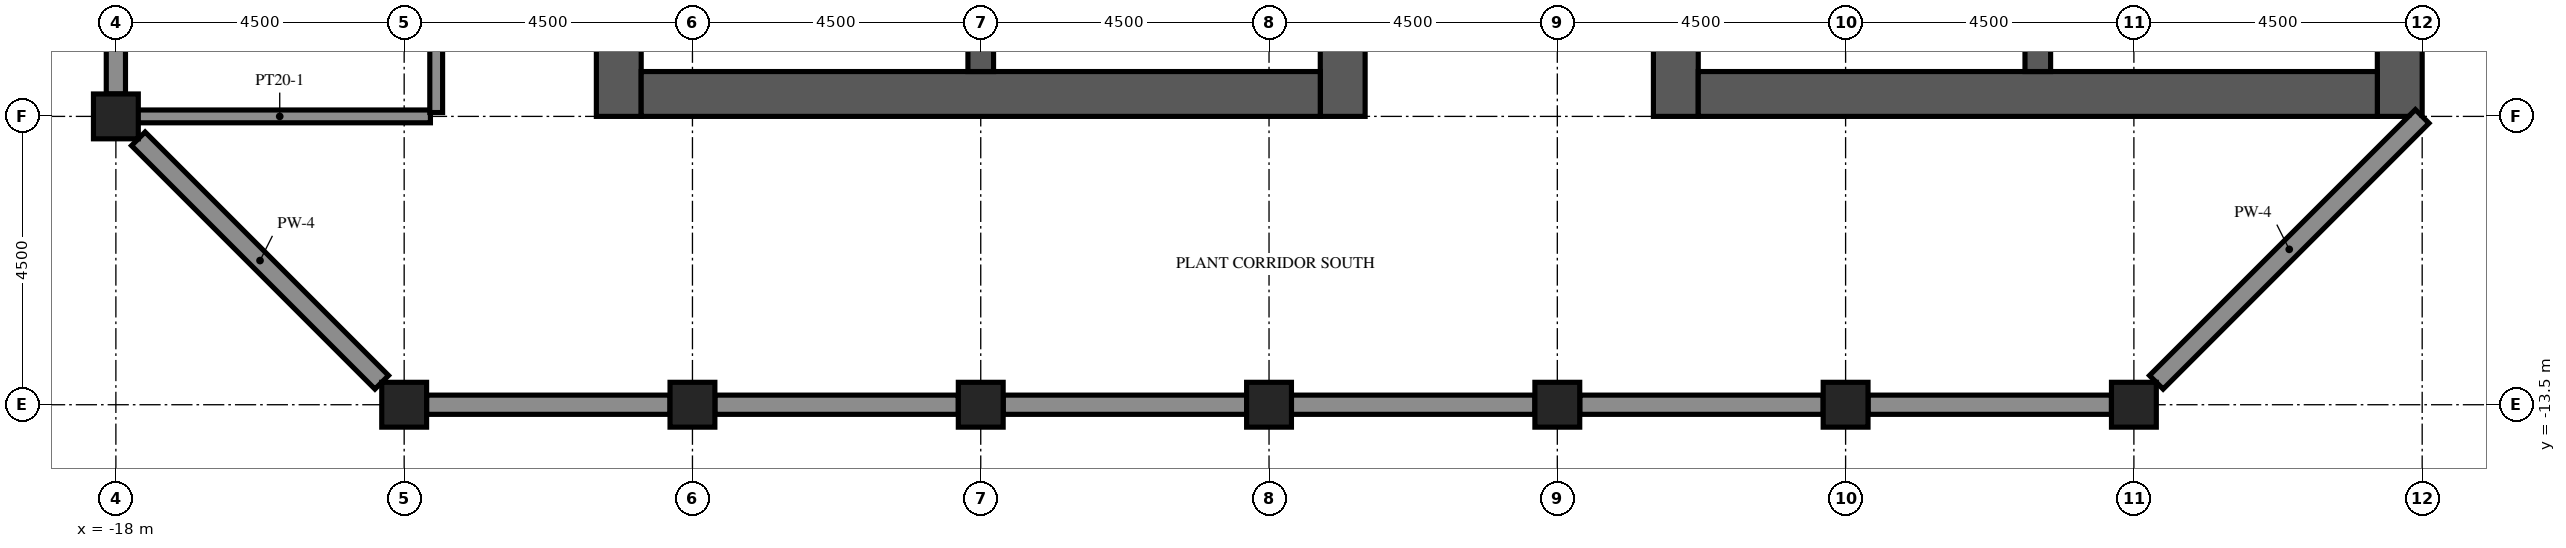
"""IFC4 building model, lengths in metres.
Left out: names, types, materials, properties, quantities, classifications, styles, units other than length and angle.
Written with IfcOpenShell. Run it as: python <this file> out.ifc"""

import sys

from ifc_helpers import new_model, si_unit, direction, frame, frame_2d, origin, origin_2d, place, context, subcontext, project, spatial, rectangle, extrude, element, save


model = new_model("IFC4")
c1 = context("Model", 3, precision=1e-05, world=origin(), true_north=direction((0.0, 1.0)))
c2 = subcontext(c1, "Body", "Model", "MODEL_VIEW")
j1 = project(units=[si_unit("LENGTHUNIT", "METRE"), si_unit("PLANEANGLEUNIT", "RADIAN")], contexts=[c1])
p1 = place(None, origin())
s1 = spatial("IfcSite", under=j1, at=p1, CompositionType="ELEMENT")
p2 = place(p1, origin())
s2 = spatial("IfcBuilding", under=s1, at=p2, CompositionType="ELEMENT")
p3 = place(p2, frame((0.0, 0.0, 301.0)))
s3 = spatial("IfcBuildingStorey", under=s2, at=p3, CompositionType="ELEMENT", Elevation=301.0)
for number, where, z_axis, x_axis in (
    (1, (-18.0, -9.0, -0.6), (0.0, 0.0, 1.0), (1.0, 0.0, 0.0)),
    (2, (-13.5, -13.5, -0.6), (0.0, 0.0, 1.0), (1.0, 0.0, 0.0)),
    (3, (-9.0, -13.5, -0.6), (0.0, 0.0, 1.0), (1.0, 0.0, 0.0)),
    (4, (-4.5, -13.5, -0.6), (0.0, 0.0, 1.0), (1.0, 0.0, 0.0)),
    (5, (0.0, -13.5, -0.6), (0.0, 0.0, 1.0), (1.0, 0.0, 0.0)),
    (6, (4.5, -13.5, -0.6), (0.0, 0.0, 1.0), (1.0, 0.0, 0.0)),
    (7, (9.0, -13.5, -0.6), (0.0, 0.0, 1.0), (1.0, 0.0, 0.0)),
    (8, (13.5, -13.5, -0.6), (0.0, 0.0, 1.0), (1.0, 0.0, 0.0)),
):
    element("IfcColumn", number, at=place(p3, frame(where, z_axis=z_axis, x_axis=x_axis)), inside=s3, PredefinedType="COLUMN", context=c2, shape_type="SweptSolid", body=[
        extrude(rectangle(XDim=0.7, YDim=0.7, at=origin_2d()), origin(), (0.0, 0.0, 1.0), 6.0),
    ])
p4 = place(p3, frame((-10.15, -9.0, 0.0), z_axis=(0.0, 0.0, 1.0), x_axis=(0.0, 1.0, 0.0)))
e9 = element("IfcWall", 9, at=p4, inside=s3, PredefinedType="SHEAR", context=c2, shape_type="SweptSolid", body=[
    extrude(rectangle(XDim=27.5, YDim=0.7, at=frame_2d((13.75, 0.0))), origin(), (0.0, 0.0, 1.0), 5.4),
])
p5 = place(p4, frame((12.55, 0.0, 0.0)))
e10 = element("IfcOpeningElement", 10, at=p5, cuts=e9, PredefinedType="OPENING", context=c2, shape_type="SweptSolid", body=[
    extrude(rectangle(XDim=2.4, YDim=2.4, at=frame_2d((1.2, 1.2))), frame((0.0, 0.36, 0.0), z_axis=(0.0, -1.0, 0.0), x_axis=(1.0, 0.0, 0.0)), (0.0, 0.0, 1.0), 0.72),
])
p6 = place(p4, frame((6.825, 0.0, 0.0)))
e11 = element("IfcOpeningElement", 11, at=p6, cuts=e9, PredefinedType="OPENING", context=c2, shape_type="SweptSolid", body=[
    extrude(rectangle(XDim=1.2, YDim=2.1, at=frame_2d((0.6, 1.05))), frame((0.0, 0.36, 0.0), z_axis=(0.0, -1.0, 0.0), x_axis=(1.0, 0.0, 0.0)), (0.0, 0.0, 1.0), 0.72),
])
p7 = place(p4, frame((19.475, 0.0, 0.0)))
e12 = element("IfcOpeningElement", 12, at=p7, cuts=e9, PredefinedType="OPENING", context=c2, shape_type="SweptSolid", body=[
    extrude(rectangle(XDim=1.2, YDim=2.1, at=frame_2d((0.6, 1.05))), frame((0.0, 0.36, 0.0), z_axis=(0.0, -1.0, 0.0), x_axis=(1.0, 0.0, 0.0)), (0.0, 0.0, 1.0), 0.72),
])
p8 = place(p3, frame((1.15, -9.0, 0.0), z_axis=(0.0, 0.0, 1.0), x_axis=(0.0, 1.0, 0.0)))
e13 = element("IfcWall", 13, at=p8, inside=s3, PredefinedType="SHEAR", context=c2, shape_type="SweptSolid", body=[
    extrude(rectangle(XDim=27.5, YDim=0.7, at=frame_2d((13.75, 0.0))), origin(), (0.0, 0.0, 1.0), 5.4),
])
p9 = place(p8, frame((12.55, 0.0, 0.0)))
e14 = element("IfcOpeningElement", 14, at=p9, cuts=e13, PredefinedType="OPENING", context=c2, shape_type="SweptSolid", body=[
    extrude(rectangle(XDim=2.4, YDim=2.4, at=frame_2d((1.2, 1.2))), frame((0.0, 0.36, 0.0), z_axis=(0.0, -1.0, 0.0), x_axis=(1.0, 0.0, 0.0)), (0.0, 0.0, 1.0), 0.72),
])
p10 = place(p8, frame((5.46, 0.0, 0.0)))
e15 = element("IfcOpeningElement", 15, at=p10, cuts=e13, PredefinedType="OPENING", context=c2, shape_type="SweptSolid", body=[
    extrude(rectangle(XDim=0.968, YDim=2.1, at=frame_2d((0.484, 1.05))), frame((0.0, 0.36, 0.0), z_axis=(0.0, -1.0, 0.0), x_axis=(1.0, 0.0, 0.0)), (0.0, 0.0, 1.0), 0.72),
])
p11 = place(p8, frame((23.54, 0.0, 0.0)))
e16 = element("IfcOpeningElement", 16, at=p11, cuts=e13, PredefinedType="OPENING", context=c2, shape_type="SweptSolid", body=[
    extrude(rectangle(XDim=1.2, YDim=2.1, at=frame_2d((0.6, 1.05))), frame((0.0, 0.36, 0.0), z_axis=(0.0, -1.0, 0.0), x_axis=(1.0, 0.0, 0.0)), (0.0, 0.0, 1.0), 0.72),
])
p12 = place(p3, frame((-9.8, -8.65, 0.0), z_axis=(0.0, 0.0, 1.0), x_axis=(1.0, 0.0, 0.0)))
e17 = element("IfcWall", 17, at=p12, inside=s3, PredefinedType="SHEAR", context=c2, shape_type="SweptSolid", body=[
    extrude(rectangle(XDim=10.6, YDim=0.7, at=frame_2d((5.3, 0.0))), origin(), (0.0, 0.0, 1.0), 5.4),
])
p13 = place(p3, frame((-4.5, -8.3, 0.0), z_axis=(0.0, 0.0, 1.0), x_axis=(0.0, 1.0, 0.0)))
e18 = element("IfcWall", 18, at=p13, inside=s3, PredefinedType="SHEAR", context=c2, shape_type="SweptSolid", body=[
    extrude(rectangle(XDim=7.6, YDim=0.4, at=frame_2d((3.8, 0.0))), origin(), (0.0, 0.0, 1.0), 5.4),
])
p14 = place(p3, frame((6.35, -9.0, 0.0), z_axis=(0.0, 0.0, 1.0), x_axis=(0.0, 1.0, 0.0)))
e19 = element("IfcWall", 19, at=p14, inside=s3, PredefinedType="SHEAR", context=c2, shape_type="SweptSolid", body=[
    extrude(rectangle(XDim=27.5, YDim=0.7, at=frame_2d((13.75, 0.0))), origin(), (0.0, 0.0, 1.0), 5.4),
])
p15 = place(p14, frame((12.55, 0.0, 0.0)))
e20 = element("IfcOpeningElement", 20, at=p15, cuts=e19, PredefinedType="OPENING", context=c2, shape_type="SweptSolid", body=[
    extrude(rectangle(XDim=2.4, YDim=2.4, at=frame_2d((1.2, 1.2))), frame((0.0, 0.36, 0.0), z_axis=(0.0, -1.0, 0.0), x_axis=(1.0, 0.0, 0.0)), (0.0, 0.0, 1.0), 0.72),
])
p16 = place(p14, frame((3.9, 0.0, 0.0)))
e21 = element("IfcOpeningElement", 21, at=p16, cuts=e19, PredefinedType="OPENING", context=c2, shape_type="SweptSolid", body=[
    extrude(rectangle(XDim=1.2, YDim=2.1, at=frame_2d((0.6, 1.05))), frame((0.0, 0.36, 0.0), z_axis=(0.0, -1.0, 0.0), x_axis=(1.0, 0.0, 0.0)), (0.0, 0.0, 1.0), 0.72),
])
p17 = place(p14, frame((22.4, 0.0, 0.0)))
e22 = element("IfcOpeningElement", 22, at=p17, cuts=e19, PredefinedType="OPENING", context=c2, shape_type="SweptSolid", body=[
    extrude(rectangle(XDim=1.2, YDim=2.1, at=frame_2d((0.6, 1.05))), frame((0.0, 0.36, 0.0), z_axis=(0.0, -1.0, 0.0), x_axis=(1.0, 0.0, 0.0)), (0.0, 0.0, 1.0), 0.72),
])
p18 = place(p3, frame((17.65, -9.0, 0.0), z_axis=(0.0, 0.0, 1.0), x_axis=(0.0, 1.0, 0.0)))
e23 = element("IfcWall", 23, at=p18, inside=s3, PredefinedType="SHEAR", context=c2, shape_type="SweptSolid", body=[
    extrude(rectangle(XDim=27.5, YDim=0.7, at=frame_2d((13.75, 0.0))), origin(), (0.0, 0.0, 1.0), 5.4),
])
p19 = place(p3, frame((6.7, -8.65, 0.0), z_axis=(0.0, 0.0, 1.0), x_axis=(1.0, 0.0, 0.0)))
e24 = element("IfcWall", 24, at=p19, inside=s3, PredefinedType="SHEAR", context=c2, shape_type="SweptSolid", body=[
    extrude(rectangle(XDim=10.6, YDim=0.7, at=frame_2d((5.3, 0.0))), origin(), (0.0, 0.0, 1.0), 5.4),
])
p20 = place(p3, frame((12.0, -8.3, 0.0), z_axis=(0.0, 0.0, 1.0), x_axis=(0.0, 1.0, 0.0)))
e25 = element("IfcWall", 25, at=p20, inside=s3, PredefinedType="SHEAR", context=c2, shape_type="SweptSolid", body=[
    extrude(rectangle(XDim=7.6, YDim=0.4, at=frame_2d((3.8, 0.0))), origin(), (0.0, 0.0, 1.0), 5.4),
])
p21 = place(p20, frame((6.125, 0.0, 0.0)))
e26 = element("IfcOpeningElement", 26, at=p21, cuts=e25, PredefinedType="OPENING", context=c2, shape_type="SweptSolid", body=[
    extrude(rectangle(XDim=1.2, YDim=2.1, at=frame_2d((0.6, 1.05))), frame((0.0, 0.21, 0.0), z_axis=(0.0, -1.0, 0.0), x_axis=(1.0, 0.0, 0.0)), (0.0, 0.0, 1.0), 0.42),
])
for number, where, z_axis, x_axis in (
    (27, (-13.15, -13.5, 0.0), (0.0, 0.0, 1.0), (1.0, 0.0, 0.0)),
    (28, (-8.65, -13.5, 0.0), (0.0, 0.0, 1.0), (1.0, 0.0, 0.0)),
    (29, (-4.15, -13.5, 0.0), (0.0, 0.0, 1.0), (1.0, 0.0, 0.0)),
    (30, (0.35, -13.5, 0.0), (0.0, 0.0, 1.0), (1.0, 0.0, 0.0)),
    (31, (4.85, -13.5, 0.0), (0.0, 0.0, 1.0), (1.0, 0.0, 0.0)),
    (32, (9.35, -13.5, 0.0), (0.0, 0.0, 1.0), (1.0, 0.0, 0.0)),
):
    element("IfcWall", number, at=place(p3, frame(where, z_axis=z_axis, x_axis=x_axis)), inside=s3, PredefinedType="SOLIDWALL", context=c2, shape_type="SweptSolid", body=[
        extrude(rectangle(XDim=3.8, YDim=0.3, at=frame_2d((1.9, 0.0))), origin(), (0.0, 0.0, 1.0), 0.85),
    ])
p22 = place(p3, frame((13.85, -13.15, 0.0), z_axis=(0.0, 0.0, 1.0), x_axis=(0.707106781187, 0.707106781187, 0.0)))
e33 = element("IfcWall", 33, at=p22, inside=s3, PredefinedType="SOLIDWALL", context=c2, shape_type="SweptSolid", body=[
    extrude(rectangle(XDim=5.869, YDim=0.3, at=frame_2d((2.935, 0.0))), origin(), (0.0, 0.0, 1.0), 4.1),
])
p23 = place(p3, frame((-18.0, -4.85, 0.0), z_axis=(0.0, 0.0, 1.0), x_axis=(0.0, -1.0, 0.0)))
e34 = element("IfcWall", 34, at=p23, inside=s3, PredefinedType="SOLIDWALL", context=c2, shape_type="SweptSolid", body=[
    extrude(rectangle(XDim=3.8, YDim=0.3, at=frame_2d((1.9, 0.0))), origin(), (0.0, 0.0, 1.0), 0.85),
])
p24 = place(p3, frame((-17.65, -9.35, 0.0), z_axis=(0.0, 0.0, 1.0), x_axis=(0.707106781187, -0.707106781187, 0.0)))
e35 = element("IfcWall", 35, at=p24, inside=s3, PredefinedType="SOLIDWALL", context=c2, shape_type="SweptSolid", body=[
    extrude(rectangle(XDim=5.374, YDim=0.3, at=frame_2d((2.687, 0.0))), origin(), (0.0, 0.0, 1.0), 4.1),
])
for number, where, z_axis, x_axis in (
    (36, (-17.917, -17.8, 0.0), (0.0, 0.0, 1.0), (-0.707, 0.707, 0.0)),
    (37, (22.3, -13.417, 0.0), (0.0, 0.0, 1.0), (-0.707, -0.707, 0.0)),
):
    element("IfcWall", number, at=place(p3, frame(where, z_axis=z_axis, x_axis=x_axis)), inside=s3, PredefinedType="PARAPET", context=c2, shape_type="SweptSolid", body=[
        extrude(rectangle(XDim=6.198, YDim=0.2, at=frame_2d((3.099, 0.0))), origin(), (0.0, 0.0, 1.0), 1.1),
    ])
p25 = place(p3, frame((-17.795, -9.0, 0.0), z_axis=(0.0, 0.0, 1.0), x_axis=(1.0, 0.0, 0.0)))
e38 = element("IfcWall", 38, at=p25, inside=s3, PredefinedType="PARTITIONING", context=c2, shape_type="SweptSolid", body=[
    extrude(rectangle(XDim=4.705, YDim=0.2, at=frame_2d((2.353, 0.0))), origin(), (0.0, 0.0, 1.0), 4.8),
])
p26 = place(p3, frame((-13.0, -8.94, 0.0), z_axis=(0.0, 0.0, 1.0), x_axis=(0.0, 1.0, 0.0)))
e39 = element("IfcWall", 39, at=p26, inside=s3, PredefinedType="PARTITIONING", context=c2, shape_type="SweptSolid", body=[
    extrude(rectangle(XDim=8.94, YDim=0.2, at=frame_2d((4.47, 0.0))), origin(), (0.0, 0.0, 1.0), 4.8),
])
p27 = place(p26, frame((4.04, 0.0, 0.0)))
e40 = element("IfcOpeningElement", 40, at=p27, cuts=e39, PredefinedType="OPENING", context=c2, shape_type="SweptSolid", body=[
    extrude(rectangle(XDim=1.0, YDim=2.1, at=frame_2d((0.5, 1.05))), frame((0.0, 0.11, 0.0), z_axis=(0.0, -1.0, 0.0), x_axis=(1.0, 0.0, 0.0)), (0.0, 0.0, 1.0), 0.22),
])
p28 = place(p3, frame((-1.75, -8.3, 0.0), z_axis=(0.0, 0.0, 1.0), x_axis=(0.0, 1.0, 0.0)))
e41 = element("IfcWall", 41, at=p28, inside=s3, PredefinedType="PARTITIONING", context=c2, shape_type="SweptSolid", body=[
    extrude(rectangle(XDim=4.56, YDim=0.1, at=frame_2d((2.28, 0.0))), origin(), (0.0, 0.0, 1.0), 4.8),
])
save(model, sys.argv[1])
